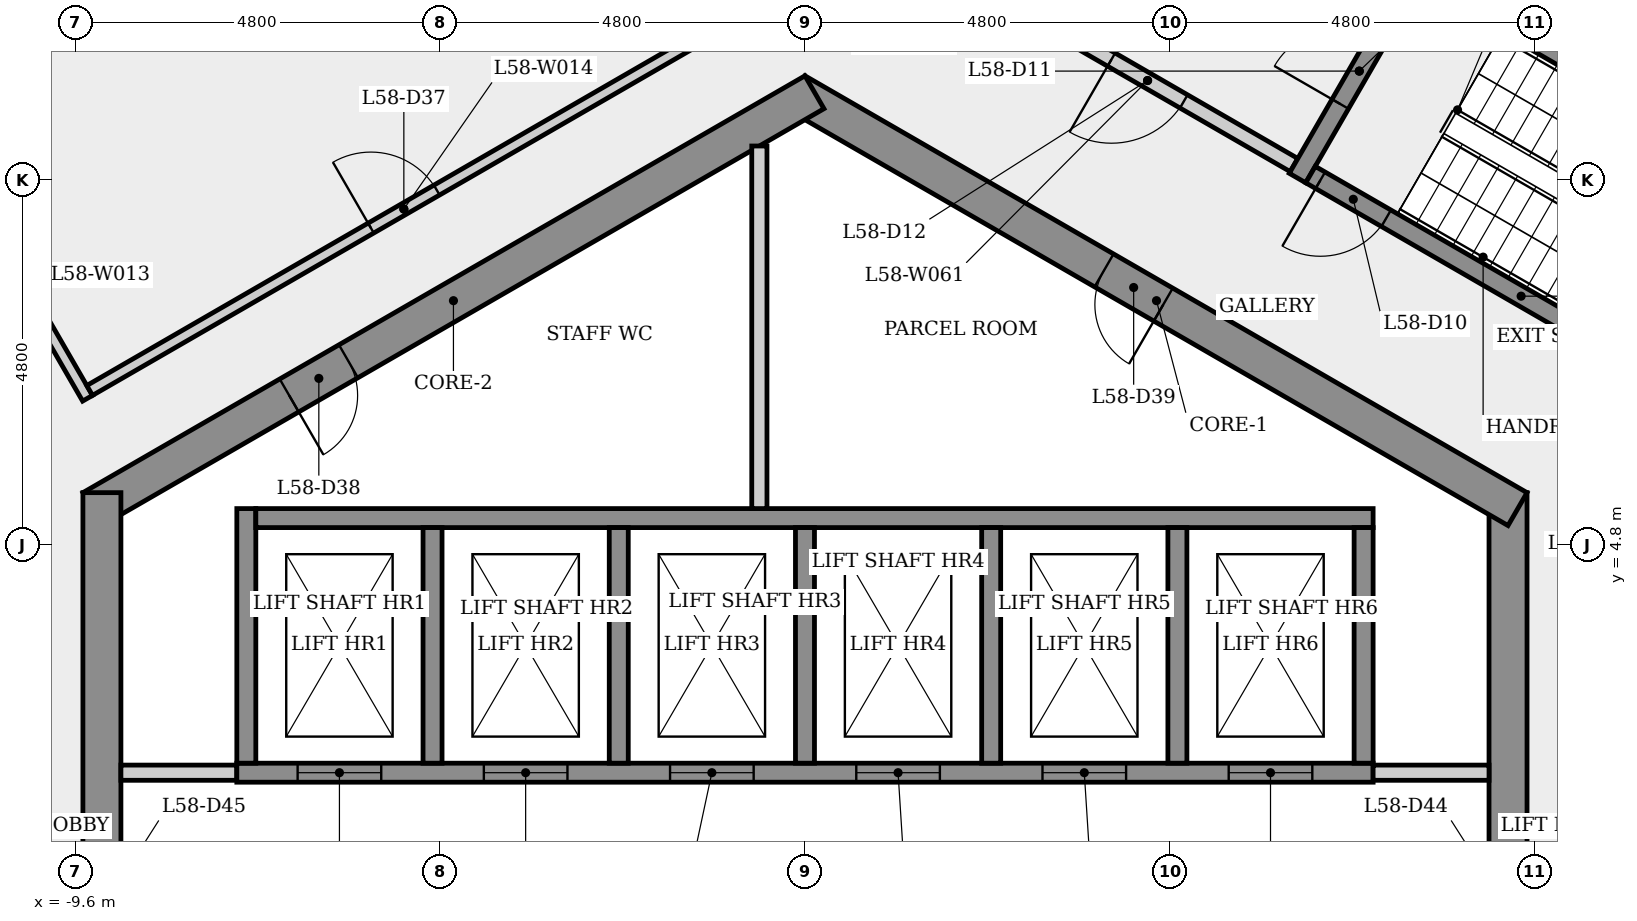
"""IFC4 building model, lengths in metres.
Left out: names, types, materials, properties, quantities, classifications, styles, units other than length and angle.
Written with IfcOpenShell. Run it as: python <this file> out.ifc"""

import sys

from ifc_helpers import new_model, si_unit, direction, frame, frame_2d, origin, place, context, subcontext, project, spatial, rectangle, extrude, element, fill, save


model = new_model("IFC4")
c1 = context("Model", 3, precision=1e-05, world=origin(), true_north=direction((0.0, 1.0)))
c2 = subcontext(c1, "Body", "Model", "MODEL_VIEW")
j1 = project(units=[si_unit("LENGTHUNIT", "METRE"), si_unit("PLANEANGLEUNIT", "RADIAN")], contexts=[c1])
p1 = place(None, origin())
s1 = spatial("IfcSite", under=j1, at=p1, CompositionType="ELEMENT")
p2 = place(p1, origin())
s2 = spatial("IfcBuilding", under=s1, at=p2, CompositionType="ELEMENT")
p3 = place(p2, frame((0.0, 0.0, 218.9)))
s3 = spatial("IfcBuildingStorey", under=s2, at=p3, CompositionType="ELEMENT", Elevation=218.9)
p4 = place(p3, frame((9.25, -5.485, 0.0), z_axis=(0.0, 0.0, 1.0), x_axis=(0.0, 1.0, 0.0)))
e1 = element("IfcWall", 1, at=p4, inside=s3, PredefinedType="SHEAR", context=c2, shape_type="SweptSolid", body=[
    extrude(rectangle(XDim=10.97, YDim=0.5, at=frame_2d((5.485, 0.0))), origin(), (0.0, 0.0, 1.0), 3.4),
])
p5 = place(p4, frame((4.685, 0.0, 0.0)))
e2 = element("IfcOpeningElement", 2, at=p5, cuts=e1, PredefinedType="OPENING", context=c2, shape_type="SweptSolid", body=[
    extrude(rectangle(XDim=1.6, YDim=2.1, at=frame_2d((0.8, 1.05))), frame((0.0, 0.26, 0.0), z_axis=(0.0, -1.0, 0.0), x_axis=(1.0, 0.0, 0.0)), (0.0, 0.0, 1.0), 0.52),
])
p6 = place(p3, frame((9.375, 5.268, 0.0), z_axis=(0.0, 0.0, 1.0), x_axis=(-0.866023993627, 0.500002442456, 0.0)))
e3 = element("IfcWall", 3, at=p6, inside=s3, PredefinedType="SHEAR", context=c2, shape_type="SweptSolid", body=[
    extrude(rectangle(XDim=10.97, YDim=0.5, at=frame_2d((5.485, 0.0))), origin(), (0.0, 0.0, 1.0), 3.4),
])
p7 = place(p6, frame((5.382, 0.0, 0.0)))
e4 = element("IfcOpeningElement", 4, at=p7, cuts=e3, PredefinedType="OPENING", context=c2, shape_type="SweptSolid", body=[
    extrude(rectangle(XDim=0.9, YDim=2.1, at=frame_2d((0.45, 1.05))), frame((0.0, 0.26, 0.0), z_axis=(0.0, -1.0, 0.0), x_axis=(1.0, 0.0, 0.0)), (0.0, 0.0, 1.0), 0.52),
])
p8 = place(p3, frame((0.125, 10.753, 0.0), z_axis=(0.0, 0.0, 1.0), x_axis=(-0.866023993627, -0.500002442456, 0.0)))
e5 = element("IfcWall", 5, at=p8, inside=s3, PredefinedType="SHEAR", context=c2, shape_type="SweptSolid", body=[
    extrude(rectangle(XDim=10.97, YDim=0.5, at=frame_2d((5.485, 0.0))), origin(), (0.0, 0.0, 1.0), 3.4),
])
p9 = place(p8, frame((7.08, 0.0, 0.0)))
e6 = element("IfcOpeningElement", 6, at=p9, cuts=e5, PredefinedType="OPENING", context=c2, shape_type="SweptSolid", body=[
    extrude(rectangle(XDim=0.9, YDim=2.1, at=frame_2d((0.45, 1.05))), frame((0.0, 0.26, 0.0), z_axis=(0.0, -1.0, 0.0), x_axis=(1.0, 0.0, 0.0)), (0.0, 0.0, 1.0), 0.52),
])
p10 = place(p3, frame((-9.25, 5.485, 0.0), z_axis=(0.0, 0.0, 1.0), x_axis=(0.0, -1.0, 0.0)))
e7 = element("IfcWall", 7, at=p10, inside=s3, PredefinedType="SHEAR", context=c2, shape_type="SweptSolid", body=[
    extrude(rectangle(XDim=10.97, YDim=0.5, at=frame_2d((5.485, 0.0))), origin(), (0.0, 0.0, 1.0), 3.4),
])
p11 = place(p10, frame((8.51, 0.0, 0.0)))
e8 = element("IfcOpeningElement", 8, at=p11, cuts=e7, PredefinedType="OPENING", context=c2, shape_type="SweptSolid", body=[
    extrude(rectangle(XDim=0.9, YDim=2.1, at=frame_2d((0.45, 1.05))), frame((0.0, 0.26, 0.0), z_axis=(0.0, -1.0, 0.0), x_axis=(1.0, 0.0, 0.0)), (0.0, 0.0, 1.0), 0.52),
])
p12 = place(p10, frame((4.685, 0.0, 0.0)))
e9 = element("IfcOpeningElement", 9, at=p12, cuts=e7, PredefinedType="OPENING", context=c2, shape_type="SweptSolid", body=[
    extrude(rectangle(XDim=1.6, YDim=2.1, at=frame_2d((0.8, 1.05))), frame((0.0, 0.26, 0.0), z_axis=(0.0, -1.0, 0.0), x_axis=(1.0, 0.0, 0.0)), (0.0, 0.0, 1.0), 0.52),
])
p13 = place(p3, frame((-11.305, 9.96, 0.0), z_axis=(0.0, 0.0, 1.0), x_axis=(0.499979060117, -0.866037493094, 0.0)))
e10 = element("IfcWall", 10, at=p13, inside=s3, PredefinedType="PARTITIONING", context=c2, shape_type="SweptSolid", body=[
    extrude(rectangle(XDim=3.734, YDim=0.15, at=frame_2d((1.867, 0.0))), origin(), (0.0, 0.0, 1.0), 3.05),
])
p14 = place(p3, frame((-9.411, 6.829, 0.0), z_axis=(0.0, 0.0, 1.0), x_axis=(0.866029717158, 0.499992528944, 0.0)))
e11 = element("IfcWall", 11, at=p14, inside=s3, PredefinedType="PARTITIONING", context=c2, shape_type="SweptSolid", body=[
    extrude(rectangle(XDim=9.547, YDim=0.15, at=frame_2d((4.773, 0.0))), origin(), (0.0, 0.0, 1.0), 3.05),
])
p15 = place(p14, frame((4.273, 0.0, 0.0)))
e12 = element("IfcOpeningElement", 12, at=p15, cuts=e11, PredefinedType="OPENING", context=c2, shape_type="SweptSolid", body=[
    extrude(rectangle(XDim=1.0, YDim=2.1, at=frame_2d((0.5, 1.05))), frame((0.0, 0.085, 0.0), z_axis=(0.0, -1.0, 0.0), x_axis=(1.0, 0.0, 0.0)), (0.0, 0.0, 1.0), 0.17),
])
p16 = place(p3, frame((-9.0, 1.8, 0.0), z_axis=(0.0, 0.0, 1.0), x_axis=(1.0, 0.0, 0.0)))
e13 = element("IfcWall", 13, at=p16, inside=s3, PredefinedType="PARTITIONING", context=c2, shape_type="SweptSolid", body=[
    extrude(rectangle(XDim=1.525, YDim=0.2, at=frame_2d((0.763, 0.0))), origin(), (0.0, 0.0, 1.0), 3.05),
])
p17 = place(p3, frame((-7.475, 1.8, 0.0), z_axis=(0.0, 0.0, 1.0), x_axis=(1.0, 0.0, 0.0)))
e14 = element("IfcWall", 14, at=p17, inside=s3, PredefinedType="SHEAR", context=c2, shape_type="SweptSolid", body=[
    extrude(rectangle(XDim=14.95, YDim=0.25, at=frame_2d((7.475, 0.0))), origin(), (0.0, 0.0, 1.0), 3.05),
])
p18 = place(p17, frame((0.8, 0.0, 0.0)))
e15 = element("IfcOpeningElement", 15, at=p18, cuts=e14, PredefinedType="OPENING", context=c2, shape_type="SweptSolid", body=[
    extrude(rectangle(XDim=1.1, YDim=2.1, at=frame_2d((0.55, 1.05))), frame((0.0, 0.135, 0.0), z_axis=(0.0, -1.0, 0.0), x_axis=(1.0, 0.0, 0.0)), (0.0, 0.0, 1.0), 0.27),
])
p19 = place(p17, frame((3.25, 0.0, 0.0)))
e16 = element("IfcOpeningElement", 16, at=p19, cuts=e14, PredefinedType="OPENING", context=c2, shape_type="SweptSolid", body=[
    extrude(rectangle(XDim=1.1, YDim=2.1, at=frame_2d((0.55, 1.05))), frame((0.0, 0.135, 0.0), z_axis=(0.0, -1.0, 0.0), x_axis=(1.0, 0.0, 0.0)), (0.0, 0.0, 1.0), 0.27),
])
p20 = place(p17, frame((5.7, 0.0, 0.0)))
e17 = element("IfcOpeningElement", 17, at=p20, cuts=e14, PredefinedType="OPENING", context=c2, shape_type="SweptSolid", body=[
    extrude(rectangle(XDim=1.1, YDim=2.1, at=frame_2d((0.55, 1.05))), frame((0.0, 0.135, 0.0), z_axis=(0.0, -1.0, 0.0), x_axis=(1.0, 0.0, 0.0)), (0.0, 0.0, 1.0), 0.27),
])
p21 = place(p17, frame((8.15, 0.0, 0.0)))
e18 = element("IfcOpeningElement", 18, at=p21, cuts=e14, PredefinedType="OPENING", context=c2, shape_type="SweptSolid", body=[
    extrude(rectangle(XDim=1.1, YDim=2.1, at=frame_2d((0.55, 1.05))), frame((0.0, 0.135, 0.0), z_axis=(0.0, -1.0, 0.0), x_axis=(1.0, 0.0, 0.0)), (0.0, 0.0, 1.0), 0.27),
])
p22 = place(p17, frame((10.6, 0.0, 0.0)))
e19 = element("IfcOpeningElement", 19, at=p22, cuts=e14, PredefinedType="OPENING", context=c2, shape_type="SweptSolid", body=[
    extrude(rectangle(XDim=1.1, YDim=2.1, at=frame_2d((0.55, 1.05))), frame((0.0, 0.135, 0.0), z_axis=(0.0, -1.0, 0.0), x_axis=(1.0, 0.0, 0.0)), (0.0, 0.0, 1.0), 0.27),
])
p23 = place(p17, frame((13.05, 0.0, 0.0)))
e20 = element("IfcOpeningElement", 20, at=p23, cuts=e14, PredefinedType="OPENING", context=c2, shape_type="SweptSolid", body=[
    extrude(rectangle(XDim=1.1, YDim=2.1, at=frame_2d((0.55, 1.05))), frame((0.0, 0.135, 0.0), z_axis=(0.0, -1.0, 0.0), x_axis=(1.0, 0.0, 0.0)), (0.0, 0.0, 1.0), 0.27),
])
p24 = place(p3, frame((-7.35, 1.925, 0.0), z_axis=(0.0, 0.0, 1.0), x_axis=(0.0, 1.0, 0.0)))
e21 = element("IfcWall", 21, at=p24, inside=s3, PredefinedType="SHEAR", context=c2, shape_type="SweptSolid", body=[
    extrude(rectangle(XDim=3.35, YDim=0.25, at=frame_2d((1.675, 0.0))), origin(), (0.0, 0.0, 1.0), 3.05),
])
p25 = place(p3, frame((-7.225, 5.15, 0.0), z_axis=(0.0, 0.0, 1.0), x_axis=(1.0, 0.0, 0.0)))
e22 = element("IfcWall", 22, at=p25, inside=s3, PredefinedType="SHEAR", context=c2, shape_type="SweptSolid", body=[
    extrude(rectangle(XDim=14.7, YDim=0.25, at=frame_2d((7.35, 0.0))), origin(), (0.0, 0.0, 1.0), 3.05),
])
for number, where, z_axis, x_axis in (
    (23, (-4.9, 5.025, 0.0), (0.0, 0.0, 1.0), (0.0, -1.0, 0.0)),
    (24, (-2.45, 5.025, 0.0), (0.0, 0.0, 1.0), (0.0, -1.0, 0.0)),
):
    element("IfcWall", number, at=place(p3, frame(where, z_axis=z_axis, x_axis=x_axis)), inside=s3, PredefinedType="SHEAR", context=c2, shape_type="SweptSolid", body=[
        extrude(rectangle(XDim=3.1, YDim=0.25, at=frame_2d((1.55, 0.0))), origin(), (0.0, 0.0, 1.0), 3.4),
    ])
p26 = place(p3, frame((-0.6, 10.046, 0.0), z_axis=(0.0, 0.0, 1.0), x_axis=(0.0, -1.0, 0.0)))
e25 = element("IfcWall", 25, at=p26, inside=s3, PredefinedType="PARTITIONING", context=c2, shape_type="SweptSolid", body=[
    extrude(rectangle(XDim=4.771, YDim=0.2, at=frame_2d((2.385, 0.0))), origin(), (0.0, 0.0, 1.0), 3.05),
])
for number, where, z_axis, x_axis in (
    (26, (0.0, 5.025, 0.0), (0.0, 0.0, 1.0), (0.0, -1.0, 0.0)),
    (27, (2.45, 5.025, 0.0), (0.0, 0.0, 1.0), (0.0, -1.0, 0.0)),
    (28, (4.9, 5.025, 0.0), (0.0, 0.0, 1.0), (0.0, -1.0, 0.0)),
):
    element("IfcWall", number, at=place(p3, frame(where, z_axis=z_axis, x_axis=x_axis)), inside=s3, PredefinedType="SHEAR", context=c2, shape_type="SweptSolid", body=[
        extrude(rectangle(XDim=3.1, YDim=0.25, at=frame_2d((1.55, 0.0))), origin(), (0.0, 0.0, 1.0), 3.4),
    ])
p27 = place(p3, frame((6.435, 9.795, 0.0), z_axis=(0.0, 0.0, 1.0), x_axis=(-0.866012907634, 0.500021643343, 0.0)))
e29 = element("IfcWall", 29, at=p27, inside=s3, PredefinedType="PARTITIONING", context=c2, shape_type="SweptSolid", body=[
    extrude(rectangle(XDim=4.45, YDim=0.2, at=frame_2d((2.225, 0.0))), origin(), (0.0, 0.0, 1.0), 3.05),
])
p28 = place(p27, frame((1.675, 0.0, 0.0)))
e30 = element("IfcOpeningElement", 30, at=p28, cuts=e29, PredefinedType="OPENING", context=c2, shape_type="SweptSolid", body=[
    extrude(rectangle(XDim=1.1, YDim=2.1, at=frame_2d((0.55, 1.05))), frame((0.0, 0.11, 0.0), z_axis=(0.0, -1.0, 0.0), x_axis=(1.0, 0.0, 0.0)), (0.0, 0.0, 1.0), 0.22),
])
p29 = place(p3, frame((6.48, 9.624, 0.0), z_axis=(0.0, 0.0, 1.0), x_axis=(0.500017246033, 0.866015446554, 0.0)))
e31 = element("IfcWall", 31, at=p29, inside=s3, PredefinedType="SHEAR", context=c2, shape_type="SweptSolid", body=[
    extrude(rectangle(XDim=3.25, YDim=0.25, at=frame_2d((1.625, 0.0))), origin(), (0.0, 0.0, 1.0), 3.05),
])
p30 = place(p29, frame((1.125, 0.0, 0.0)))
e32 = element("IfcOpeningElement", 32, at=p30, cuts=e31, PredefinedType="OPENING", context=c2, shape_type="SweptSolid", body=[
    extrude(rectangle(XDim=1.0, YDim=2.1, at=frame_2d((0.5, 1.05))), frame((0.0, 0.135, 0.0), z_axis=(0.0, -1.0, 0.0), x_axis=(1.0, 0.0, 0.0)), (0.0, 0.0, 1.0), 0.27),
])
p31 = place(p3, frame((7.475, 1.8, 0.0), z_axis=(0.0, 0.0, 1.0), x_axis=(1.0, 0.0, 0.0)))
e33 = element("IfcWall", 33, at=p31, inside=s3, PredefinedType="PARTITIONING", context=c2, shape_type="SweptSolid", body=[
    extrude(rectangle(XDim=1.525, YDim=0.2, at=frame_2d((0.763, 0.0))), origin(), (0.0, 0.0, 1.0), 3.05),
])
p32 = place(p3, frame((7.35, 5.025, 0.0), z_axis=(0.0, 0.0, 1.0), x_axis=(0.0, -1.0, 0.0)))
e34 = element("IfcWall", 34, at=p32, inside=s3, PredefinedType="SHEAR", context=c2, shape_type="SweptSolid", body=[
    extrude(rectangle(XDim=3.1, YDim=0.25, at=frame_2d((1.55, 0.0))), origin(), (0.0, 0.0, 1.0), 3.4),
])
p33 = place(p3, frame((8.151, 12.268, 0.0), z_axis=(0.0, 0.0, 1.0), x_axis=(0.866025499775, -0.499999833739, 0.0)))
e35 = element("IfcWall", 35, at=p33, inside=s3, PredefinedType="SHEAR", context=c2, shape_type="SweptSolid", body=[
    extrude(rectangle(XDim=6.4, YDim=0.25, at=frame_2d((3.2, 0.0))), origin(), (0.0, 0.0, 1.0), 3.05),
])
p34 = place(p3, frame((12.194, 6.47, 0.0), z_axis=(0.0, 0.0, 1.0), x_axis=(-0.866025499775, 0.499999833739, 0.0)))
e36 = element("IfcWall", 36, at=p34, inside=s3, PredefinedType="SHEAR", context=c2, shape_type="SweptSolid", body=[
    extrude(rectangle(XDim=6.4, YDim=0.25, at=frame_2d((3.2, 0.0))), origin(), (0.0, 0.0, 1.0), 3.05),
])
p35 = place(p34, frame((5.25, 0.0, 0.0)))
e37 = element("IfcOpeningElement", 37, at=p35, cuts=e36, PredefinedType="OPENING", context=c2, shape_type="SweptSolid", body=[
    extrude(rectangle(XDim=1.0, YDim=2.1, at=frame_2d((0.5, 1.05))), frame((0.0, 0.135, 0.0), z_axis=(0.0, -1.0, 0.0), x_axis=(1.0, 0.0, 0.0)), (0.0, 0.0, 1.0), 0.27),
])
p36 = place(p18, origin())
e38 = element("IfcDoor", 38, at=p36, inside=s3, OperationType="SLIDING_TO_LEFT", PredefinedType="DOOR", context=c2, shape_type="SweptSolid", body=[
    extrude(rectangle(XDim=1.1, YDim=2.1, at=frame_2d((0.55, 1.05))), frame((0.0, 0.025, 0.0), z_axis=(0.0, -1.0, 0.0), x_axis=(1.0, 0.0, 0.0)), (0.0, 0.0, 1.0), 0.05),
])
fill(e15, e38)
p37 = place(p19, origin())
e39 = element("IfcDoor", 39, at=p37, inside=s3, OperationType="SLIDING_TO_LEFT", PredefinedType="DOOR", context=c2, shape_type="SweptSolid", body=[
    extrude(rectangle(XDim=1.1, YDim=2.1, at=frame_2d((0.55, 1.05))), frame((0.0, 0.025, 0.0), z_axis=(0.0, -1.0, 0.0), x_axis=(1.0, 0.0, 0.0)), (0.0, 0.0, 1.0), 0.05),
])
fill(e16, e39)
p38 = place(p20, origin())
e40 = element("IfcDoor", 40, at=p38, inside=s3, OperationType="SLIDING_TO_LEFT", PredefinedType="DOOR", context=c2, shape_type="SweptSolid", body=[
    extrude(rectangle(XDim=1.1, YDim=2.1, at=frame_2d((0.55, 1.05))), frame((0.0, 0.025, 0.0), z_axis=(0.0, -1.0, 0.0), x_axis=(1.0, 0.0, 0.0)), (0.0, 0.0, 1.0), 0.05),
])
fill(e17, e40)
p39 = place(p21, origin())
e41 = element("IfcDoor", 41, at=p39, inside=s3, OperationType="SLIDING_TO_LEFT", PredefinedType="DOOR", context=c2, shape_type="SweptSolid", body=[
    extrude(rectangle(XDim=1.1, YDim=2.1, at=frame_2d((0.55, 1.05))), frame((0.0, 0.025, 0.0), z_axis=(0.0, -1.0, 0.0), x_axis=(1.0, 0.0, 0.0)), (0.0, 0.0, 1.0), 0.05),
])
fill(e18, e41)
p40 = place(p22, origin())
e42 = element("IfcDoor", 42, at=p40, inside=s3, OperationType="SLIDING_TO_LEFT", PredefinedType="DOOR", context=c2, shape_type="SweptSolid", body=[
    extrude(rectangle(XDim=1.1, YDim=2.1, at=frame_2d((0.55, 1.05))), frame((0.0, 0.025, 0.0), z_axis=(0.0, -1.0, 0.0), x_axis=(1.0, 0.0, 0.0)), (0.0, 0.0, 1.0), 0.05),
])
fill(e19, e42)
p41 = place(p23, origin())
e43 = element("IfcDoor", 43, at=p41, inside=s3, OperationType="SLIDING_TO_LEFT", PredefinedType="DOOR", context=c2, shape_type="SweptSolid", body=[
    extrude(rectangle(XDim=1.1, YDim=2.1, at=frame_2d((0.55, 1.05))), frame((0.0, 0.025, 0.0), z_axis=(0.0, -1.0, 0.0), x_axis=(1.0, 0.0, 0.0)), (0.0, 0.0, 1.0), 0.05),
])
fill(e20, e43)
p42 = place(p35, origin())
e44 = element("IfcDoor", 44, at=p42, inside=s3, OperationType="SINGLE_SWING_RIGHT", PredefinedType="DOOR", context=c2, shape_type="SweptSolid", body=[
    extrude(rectangle(XDim=1.0, YDim=2.1, at=frame_2d((0.5, 1.05))), frame((0.0, 0.025, 0.0), z_axis=(0.0, -1.0, 0.0), x_axis=(1.0, 0.0, 0.0)), (0.0, 0.0, 1.0), 0.05),
])
fill(e37, e44)
p43 = place(p30, origin())
e45 = element("IfcDoor", 45, at=p43, inside=s3, OperationType="SINGLE_SWING_LEFT", PredefinedType="DOOR", context=c2, shape_type="SweptSolid", body=[
    extrude(rectangle(XDim=1.0, YDim=2.1, at=frame_2d((0.5, 1.05))), frame((0.0, 0.025, 0.0), z_axis=(0.0, -1.0, 0.0), x_axis=(1.0, 0.0, 0.0)), (0.0, 0.0, 1.0), 0.05),
])
fill(e32, e45)
p44 = place(p28, origin())
e46 = element("IfcDoor", 46, at=p44, inside=s3, OperationType="SINGLE_SWING_RIGHT", PredefinedType="DOOR", context=c2, shape_type="SweptSolid", body=[
    extrude(rectangle(XDim=1.1, YDim=2.1, at=frame_2d((0.55, 1.05))), frame((0.0, 0.025, 0.0), z_axis=(0.0, -1.0, 0.0), x_axis=(1.0, 0.0, 0.0)), (0.0, 0.0, 1.0), 0.05),
])
fill(e30, e46)
p45 = place(p15, origin())
e47 = element("IfcDoor", 47, at=p45, inside=s3, OperationType="SINGLE_SWING_LEFT", PredefinedType="DOOR", context=c2, shape_type="SweptSolid", body=[
    extrude(rectangle(XDim=1.0, YDim=2.1, at=frame_2d((0.5, 1.05))), frame((0.0, 0.025, 0.0), z_axis=(0.0, -1.0, 0.0), x_axis=(1.0, 0.0, 0.0)), (0.0, 0.0, 1.0), 0.05),
])
fill(e12, e47)
p46 = place(p9, origin())
e48 = element("IfcDoor", 48, at=p46, inside=s3, OperationType="SINGLE_SWING_RIGHT", PredefinedType="DOOR", context=c2, shape_type="SweptSolid", body=[
    extrude(rectangle(XDim=0.9, YDim=2.1, at=frame_2d((0.45, 1.05))), frame((0.0, 0.025, 0.0), z_axis=(0.0, -1.0, 0.0), x_axis=(1.0, 0.0, 0.0)), (0.0, 0.0, 1.0), 0.05),
])
fill(e6, e48)
p47 = place(p7, origin())
e49 = element("IfcDoor", 49, at=p47, inside=s3, OperationType="SINGLE_SWING_LEFT", PredefinedType="DOOR", context=c2, shape_type="SweptSolid", body=[
    extrude(rectangle(XDim=0.9, YDim=2.1, at=frame_2d((0.45, 1.05))), frame((0.0, 0.025, 0.0), z_axis=(0.0, -1.0, 0.0), x_axis=(1.0, 0.0, 0.0)), (0.0, 0.0, 1.0), 0.05),
])
fill(e4, e49)
save(model, sys.argv[1])
